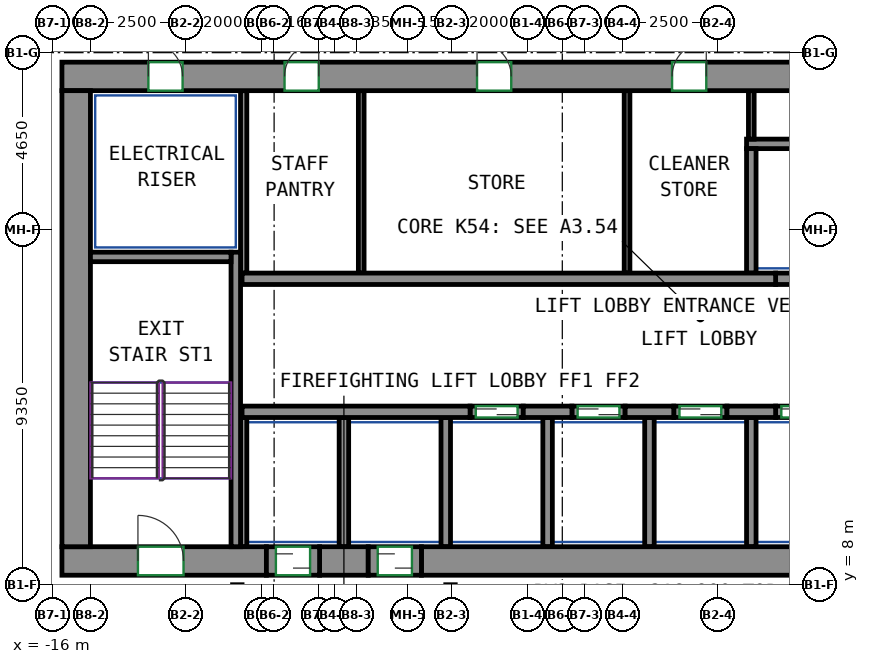
"""IFC4 building model, lengths in metres.
Left out: names, types, materials, properties, quantities, classifications, styles, units other than length and angle.
Written with IfcOpenShell. Run it as: python <this file> out.ifc"""

import sys

from ifc_helpers import new_model, si_unit, direction, frame, frame_2d, origin, place, context, subcontext, project, spatial, rectangle, extrude, source, transform, mapped, element, fill, save


model = new_model("IFC4")
c1 = context("Model", 3, precision=1e-05, world=origin(), true_north=direction((0.0, 1.0)))
c2 = subcontext(c1, "Body", "Model", "MODEL_VIEW")
j1 = project(units=[si_unit("LENGTHUNIT", "METRE"), si_unit("PLANEANGLEUNIT", "RADIAN")], contexts=[c1])
p1 = place(None, origin())
s1 = spatial("IfcSite", under=j1, at=p1, CompositionType="ELEMENT")
p2 = place(p1, origin())
s2 = spatial("IfcBuilding", under=s1, at=p2, CompositionType="ELEMENT")
p3 = place(p2, frame((0.0, 0.0, 216.9)))
s3 = spatial("IfcBuildingStorey", under=s2, at=p3, CompositionType="ELEMENT", Elevation=216.9)
m1 = source(origin(), c2, "Body", "SweptSolid", [
    extrude(rectangle(XDim=5.38, YDim=0.75, at=frame_2d((2.69, 0.0))), origin(), (0.0, 0.0, 1.0), 3.12),
])
p4 = place(p3, frame((-15.75, 8.625, 0.0), z_axis=(0.0, 0.0, 1.0), x_axis=(1.0, 0.0, 0.0)))
e1 = element("IfcWall", 1, at=p4, inside=s3, PredefinedType="SHEAR", context=c2, shape_type="MappedRepresentation", body=[
    mapped(m1, transform((0.0, 0.0, 0.0))),
])
p5 = place(p4, frame((2.0, 0.0, 0.0)))
e2 = element("IfcOpeningElement", 2, at=p5, cuts=e1, PredefinedType="OPENING", context=c2, shape_type="SweptSolid", body=[
    extrude(rectangle(XDim=1.2, YDim=2.1, at=frame_2d((0.6, 1.05))), frame((0.0, 0.385, 0.0), z_axis=(0.0, -1.0, 0.0), x_axis=(1.0, 0.0, 0.0)), (0.0, 0.0, 1.0), 0.77),
])
m2 = source(origin(), c2, "Body", "SweptSolid", [
    extrude(rectangle(XDim=1.28, YDim=0.75, at=frame_2d((0.64, 0.0))), origin(), (0.0, 0.0, 1.0), 3.12),
])
p6 = place(p3, frame((-8.97, 8.625, 0.0), z_axis=(0.0, 0.0, 1.0), x_axis=(1.0, 0.0, 0.0)))
e3 = element("IfcWall", 3, at=p6, inside=s3, PredefinedType="SHEAR", context=c2, shape_type="MappedRepresentation", body=[
    mapped(m2, transform((0.0, 0.0, 0.0))),
])
m3 = source(origin(), c2, "Body", "SweptSolid", [
    extrude(rectangle(XDim=14.18, YDim=0.75, at=frame_2d((7.09, 0.0))), origin(), (0.0, 0.0, 1.0), 3.12),
])
p7 = place(p3, frame((-6.29, 8.625, 0.0), z_axis=(0.0, 0.0, 1.0), x_axis=(1.0, 0.0, 0.0)))
e4 = element("IfcWall", 4, at=p7, inside=s3, PredefinedType="SHEAR", context=c2, shape_type="MappedRepresentation", body=[
    mapped(m3, transform((0.0, 0.0, 0.0))),
])
m4 = source(origin(), c2, "Body", "SweptSolid", [
    extrude(rectangle(XDim=33.6, YDim=0.75, at=frame_2d((16.8, 0.0))), origin(), (0.0, 0.0, 1.0), 3.12),
])
p8 = place(p3, frame((-15.75, 21.375, 0.0), z_axis=(0.0, 0.0, 1.0), x_axis=(1.0, 0.0, 0.0)))
e5 = element("IfcWall", 5, at=p8, inside=s3, PredefinedType="SHEAR", context=c2, shape_type="MappedRepresentation", body=[
    mapped(m4, transform((0.0, 0.0, 0.0))),
])
p9 = place(p8, frame((5.858, 0.0, 0.0)))
e6 = element("IfcOpeningElement", 6, at=p9, cuts=e5, PredefinedType="OPENING", context=c2, shape_type="SweptSolid", body=[
    extrude(rectangle(XDim=0.9, YDim=2.1, at=frame_2d((0.45, 1.05))), frame((0.0, 0.385, 0.0), z_axis=(0.0, -1.0, 0.0), x_axis=(1.0, 0.0, 0.0)), (0.0, 0.0, 1.0), 0.77),
])
p10 = place(p8, frame((10.923, 0.0, 0.0)))
e7 = element("IfcOpeningElement", 7, at=p10, cuts=e5, PredefinedType="OPENING", context=c2, shape_type="SweptSolid", body=[
    extrude(rectangle(XDim=0.9, YDim=2.1, at=frame_2d((0.45, 1.05))), frame((0.0, 0.385, 0.0), z_axis=(0.0, -1.0, 0.0), x_axis=(1.0, 0.0, 0.0)), (0.0, 0.0, 1.0), 0.77),
])
p11 = place(p8, frame((16.055, 0.0, 0.0)))
e8 = element("IfcOpeningElement", 8, at=p11, cuts=e5, PredefinedType="OPENING", context=c2, shape_type="SweptSolid", body=[
    extrude(rectangle(XDim=0.9, YDim=2.1, at=frame_2d((0.45, 1.05))), frame((0.0, 0.385, 0.0), z_axis=(0.0, -1.0, 0.0), x_axis=(1.0, 0.0, 0.0)), (0.0, 0.0, 1.0), 0.77),
])
p12 = place(p8, frame((20.879, 0.0, 0.0)))
e9 = element("IfcOpeningElement", 9, at=p12, cuts=e5, PredefinedType="OPENING", context=c2, shape_type="SweptSolid", body=[
    extrude(rectangle(XDim=0.9, YDim=2.1, at=frame_2d((0.45, 1.05))), frame((0.0, 0.385, 0.0), z_axis=(0.0, -1.0, 0.0), x_axis=(1.0, 0.0, 0.0)), (0.0, 0.0, 1.0), 0.77),
])
p13 = place(p8, frame((26.239, 0.0, 0.0)))
e10 = element("IfcOpeningElement", 10, at=p13, cuts=e5, PredefinedType="OPENING", context=c2, shape_type="SweptSolid", body=[
    extrude(rectangle(XDim=0.9, YDim=2.1, at=frame_2d((0.45, 1.05))), frame((0.0, 0.385, 0.0), z_axis=(0.0, -1.0, 0.0), x_axis=(1.0, 0.0, 0.0)), (0.0, 0.0, 1.0), 0.77),
])
p14 = place(p8, frame((2.275, 0.0, 0.0)))
e11 = element("IfcOpeningElement", 11, at=p14, cuts=e5, PredefinedType="OPENING", context=c2, shape_type="SweptSolid", body=[
    extrude(rectangle(XDim=0.9, YDim=2.1, at=frame_2d((0.45, 1.05))), frame((0.0, 0.385, 0.0), z_axis=(0.0, -1.0, 0.0), x_axis=(1.0, 0.0, 0.0)), (0.0, 0.0, 1.0), 0.77),
])
p15 = place(p8, frame((30.425, 0.0, 0.0)))
e12 = element("IfcOpeningElement", 12, at=p15, cuts=e5, PredefinedType="OPENING", context=c2, shape_type="SweptSolid", body=[
    extrude(rectangle(XDim=0.9, YDim=2.1, at=frame_2d((0.45, 1.05))), frame((0.0, 0.385, 0.0), z_axis=(0.0, -1.0, 0.0), x_axis=(1.0, 0.0, 0.0)), (0.0, 0.0, 1.0), 0.77),
])
m5 = source(origin(), c2, "Body", "SweptSolid", [
    extrude(rectangle(XDim=12.0, YDim=0.75, at=frame_2d((6.0, 0.0))), origin(), (0.0, 0.0, 1.0), 3.12),
])
p16 = place(p3, frame((-15.375, 9.0, 0.0), z_axis=(0.0, 0.0, 1.0), x_axis=(0.0, 1.0, 0.0)))
e13 = element("IfcWall", 13, at=p16, inside=s3, PredefinedType="SHEAR", context=c2, shape_type="MappedRepresentation", body=[
    mapped(m5, transform((0.0, 0.0, 0.0))),
])
m6 = source(origin(), c2, "Body", "SweptSolid", [
    extrude(rectangle(XDim=7.75, YDim=0.25, at=frame_2d((3.875, 0.0))), origin(), (0.0, 0.0, 1.0), 3.12),
])
p17 = place(p3, frame((-11.175, 9.0, 0.0), z_axis=(0.0, 0.0, 1.0), x_axis=(0.0, 1.0, 0.0)))
e14 = element("IfcWall", 14, at=p17, inside=s3, PredefinedType="SHEAR", context=c2, shape_type="MappedRepresentation", body=[
    mapped(m6, transform((0.0, 0.0, 0.0))),
])
m7 = source(origin(), c2, "Body", "SweptSolid", [
    extrude(rectangle(XDim=3.7, YDim=0.25, at=frame_2d((1.85, 0.0))), origin(), (0.0, 0.0, 1.0), 3.12),
])
p18 = place(p3, frame((-15.0, 16.625, 0.0), z_axis=(0.0, 0.0, 1.0), x_axis=(1.0, 0.0, 0.0)))
e15 = element("IfcWall", 15, at=p18, inside=s3, PredefinedType="SHEAR", context=c2, shape_type="MappedRepresentation", body=[
    mapped(m7, transform((0.0, 0.0, 0.0))),
])
m8 = source(origin(), c2, "Body", "SweptSolid", [
    extrude(rectangle(XDim=6.0, YDim=0.3, at=frame_2d((3.0, 0.0))), origin(), (0.0, 0.0, 1.0), 3.12),
])
p19 = place(p3, frame((-11.01, 12.55, 0.0), z_axis=(0.0, 0.0, 1.0), x_axis=(1.0, 0.0, 0.0)))
e16 = element("IfcWall", 16, at=p19, inside=s3, PredefinedType="SHEAR", context=c2, shape_type="MappedRepresentation", body=[
    mapped(m8, transform((0.0, 0.0, 0.0))),
])
m9 = source(origin(), c2, "Body", "SweptSolid", [
    extrude(rectangle(XDim=1.28, YDim=0.3, at=frame_2d((0.64, 0.0))), origin(), (0.0, 0.0, 1.0), 3.12),
])
for number, where, z_axis, x_axis in (
    (17, (-3.61, 12.55, 0.0), (0.0, 0.0, 1.0), (1.0, 0.0, 0.0)),
    (18, (-0.93, 12.55, 0.0), (0.0, 0.0, 1.0), (1.0, 0.0, 0.0)),
    (19, (1.75, 12.55, 0.0), (0.0, 0.0, 1.0), (1.0, 0.0, 0.0)),
):
    element("IfcWall", number, at=place(p3, frame(where, z_axis=z_axis, x_axis=x_axis)), inside=s3, PredefinedType="SHEAR", context=c2, shape_type="MappedRepresentation", body=[
        mapped(m9, transform((0.0, 0.0, 0.0))),
    ])
m10 = source(origin(), c2, "Body", "SweptSolid", [
    extrude(rectangle(XDim=14.04, YDim=0.3, at=frame_2d((7.02, 0.0))), origin(), (0.0, 0.0, 1.0), 3.12),
])
p20 = place(p3, frame((-11.01, 16.05, 0.0), z_axis=(0.0, 0.0, 1.0), x_axis=(1.0, 0.0, 0.0)))
e20 = element("IfcWall", 20, at=p20, inside=s3, PredefinedType="SHEAR", context=c2, shape_type="MappedRepresentation", body=[
    mapped(m10, transform((0.0, 0.0, 0.0))),
])
m11 = source(origin(), c2, "Body", "SweptSolid", [
    extrude(rectangle(XDim=1.4, YDim=0.3, at=frame_2d((0.7, 0.0))), origin(), (0.0, 0.0, 1.0), 3.12),
])
p21 = place(p3, frame((-5.01, 12.55, 0.0), z_axis=(0.0, 0.0, 1.0), x_axis=(1.0, 0.0, 0.0)))
e21 = element("IfcWall", 21, at=p21, inside=s3, PredefinedType="PARTITIONING", context=c2, shape_type="MappedRepresentation", body=[
    mapped(m11, transform((0.0, 0.0, 0.0))),
])
p22 = place(p21, frame((0.15, 0.0, 0.0)))
e22 = element("IfcOpeningElement", 22, at=p22, cuts=e21, PredefinedType="OPENING", context=c2, shape_type="SweptSolid", body=[
    extrude(rectangle(XDim=1.1, YDim=2.1, at=frame_2d((0.55, 1.05))), frame((0.0, 0.16, 0.0), z_axis=(0.0, -1.0, 0.0), x_axis=(1.0, 0.0, 0.0)), (0.0, 0.0, 1.0), 0.32),
])
m12 = source(origin(), c2, "Body", "SweptSolid", [
    extrude(rectangle(XDim=1.4, YDim=0.3, at=frame_2d((0.7, 0.0))), origin(), (0.0, 0.0, 1.0), 3.12),
])
p23 = place(p3, frame((-2.33, 12.55, 0.0), z_axis=(0.0, 0.0, 1.0), x_axis=(1.0, 0.0, 0.0)))
e23 = element("IfcWall", 23, at=p23, inside=s3, PredefinedType="PARTITIONING", context=c2, shape_type="MappedRepresentation", body=[
    mapped(m12, transform((0.0, 0.0, 0.0))),
])
p24 = place(p23, frame((0.15, 0.0, 0.0)))
e24 = element("IfcOpeningElement", 24, at=p24, cuts=e23, PredefinedType="OPENING", context=c2, shape_type="SweptSolid", body=[
    extrude(rectangle(XDim=1.1, YDim=2.1, at=frame_2d((0.55, 1.05))), frame((0.0, 0.16, 0.0), z_axis=(0.0, -1.0, 0.0), x_axis=(1.0, 0.0, 0.0)), (0.0, 0.0, 1.0), 0.32),
])
p25 = place(p3, frame((0.35, 12.55, 0.0), z_axis=(0.0, 0.0, 1.0), x_axis=(1.0, 0.0, 0.0)))
e25 = element("IfcWall", 25, at=p25, inside=s3, PredefinedType="PARTITIONING", context=c2, shape_type="MappedRepresentation", body=[
    mapped(m11, transform((0.0, 0.0, 0.0))),
])
p26 = place(p25, frame((0.15, 0.0, 0.0)))
e26 = element("IfcOpeningElement", 26, at=p26, cuts=e25, PredefinedType="OPENING", context=c2, shape_type="SweptSolid", body=[
    extrude(rectangle(XDim=1.1, YDim=2.1, at=frame_2d((0.55, 1.05))), frame((0.0, 0.16, 0.0), z_axis=(0.0, -1.0, 0.0), x_axis=(1.0, 0.0, 0.0)), (0.0, 0.0, 1.0), 0.32),
])
p27 = place(p3, frame((3.03, 12.55, 0.0), z_axis=(0.0, 0.0, 1.0), x_axis=(1.0, 0.0, 0.0)))
e27 = element("IfcWall", 27, at=p27, inside=s3, PredefinedType="PARTITIONING", context=c2, shape_type="MappedRepresentation", body=[
    mapped(m11, transform((0.0, 0.0, 0.0))),
])
p28 = place(p27, frame((0.15, 0.0, 0.0)))
e28 = element("IfcOpeningElement", 28, at=p28, cuts=e27, PredefinedType="OPENING", context=c2, shape_type="SweptSolid", body=[
    extrude(rectangle(XDim=1.1, YDim=2.1, at=frame_2d((0.55, 1.05))), frame((0.0, 0.16, 0.0), z_axis=(0.0, -1.0, 0.0), x_axis=(1.0, 0.0, 0.0)), (0.0, 0.0, 1.0), 0.32),
])
p29 = place(p3, frame((3.03, 16.05, 0.0), z_axis=(0.0, 0.0, 1.0), x_axis=(1.0, 0.0, 0.0)))
e29 = element("IfcWall", 29, at=p29, inside=s3, PredefinedType="PARTITIONING", context=c2, shape_type="MappedRepresentation", body=[
    mapped(m11, transform((0.0, 0.0, 0.0))),
])
m13 = source(origin(), c2, "Body", "SweptSolid", [
    extrude(rectangle(XDim=10.97, YDim=0.25, at=frame_2d((5.485, 0.0))), origin(), (0.0, 0.0, 1.0), 3.12),
])
p30 = place(p3, frame((2.265, 19.6, 0.0), z_axis=(0.0, 0.0, 1.0), x_axis=(1.0, 0.0, 0.0)))
e30 = element("IfcWall", 30, at=p30, inside=s3, PredefinedType="PARTITIONING", context=c2, shape_type="MappedRepresentation", body=[
    mapped(m13, transform((0.0, 0.0, 0.0))),
])
m14 = source(origin(), c2, "Body", "SweptSolid", [
    extrude(rectangle(XDim=4.8, YDim=0.165, at=frame_2d((2.4, 0.0))), origin(), (0.0, 0.0, 1.0), 3.12),
])
p31 = place(p3, frame((-10.968, 16.2, 0.0), z_axis=(0.0, 0.0, 1.0), x_axis=(0.0, 1.0, 0.0)))
e31 = element("IfcWall", 31, at=p31, inside=s3, PredefinedType="PARTITIONING", context=c2, shape_type="MappedRepresentation", body=[
    mapped(m14, transform((0.0, 0.0, 0.0))),
])
m15 = source(origin(), c2, "Body", "SweptSolid", [
    extrude(rectangle(XDim=3.275, YDim=0.25, at=frame_2d((1.638, 0.0))), origin(), (0.0, 0.0, 1.0), 3.12),
])
p32 = place(p3, frame((2.39, 16.2, 0.0), z_axis=(0.0, 0.0, 1.0), x_axis=(0.0, 1.0, 0.0)))
e32 = element("IfcWall", 32, at=p32, inside=s3, PredefinedType="PARTITIONING", context=c2, shape_type="MappedRepresentation", body=[
    mapped(m15, transform((0.0, 0.0, 0.0))),
])
m16 = source(origin(), c2, "Body", "SweptSolid", [
    extrude(rectangle(XDim=3.4, YDim=0.25, at=frame_2d((1.7, 0.0))), origin(), (0.0, 0.0, 1.0), 3.12),
])
for number, where, z_axis, x_axis in (
    (33, (2.39, 9.0, 0.0), (0.0, 0.0, 1.0), (0.0, 1.0, 0.0)),
    (34, (-0.29, 9.0, 0.0), (0.0, 0.0, 1.0), (0.0, 1.0, 0.0)),
):
    element("IfcWall", number, at=place(p3, frame(where, z_axis=z_axis, x_axis=x_axis)), inside=s3, PredefinedType="PARTITIONING", context=c2, shape_type="MappedRepresentation", body=[
        mapped(m16, transform((0.0, 0.0, 0.0))),
    ])
m17 = source(origin(), c2, "Body", "SweptSolid", [
    extrude(rectangle(XDim=3.4, YDim=0.165, at=frame_2d((1.7, 0.0))), origin(), (0.0, 0.0, 1.0), 3.12),
])
p33 = place(p3, frame((-10.968, 9.0, 0.0), z_axis=(0.0, 0.0, 1.0), x_axis=(0.0, 1.0, 0.0)))
e35 = element("IfcWall", 35, at=p33, inside=s3, PredefinedType="PARTITIONING", context=c2, shape_type="MappedRepresentation", body=[
    mapped(m17, transform((0.0, 0.0, 0.0))),
])
for number, where, z_axis, x_axis in (
    (36, (-2.97, 9.0, 0.0), (0.0, 0.0, 1.0), (0.0, 1.0, 0.0)),
    (37, (-5.65, 9.0, 0.0), (0.0, 0.0, 1.0), (0.0, 1.0, 0.0)),
    (38, (-8.33, 9.0, 0.0), (0.0, 0.0, 1.0), (0.0, 1.0, 0.0)),
):
    element("IfcWall", number, at=place(p3, frame(where, z_axis=z_axis, x_axis=x_axis)), inside=s3, PredefinedType="PARTITIONING", context=c2, shape_type="MappedRepresentation", body=[
        mapped(m16, transform((0.0, 0.0, 0.0))),
    ])
m18 = source(origin(), c2, "Body", "SweptSolid", [
    extrude(rectangle(XDim=4.8, YDim=0.15, at=frame_2d((2.4, 0.0))), origin(), (0.0, 0.0, 1.0), 3.12),
])
for number, where, z_axis, x_axis in (
    (39, (-7.875, 16.2, 0.0), (0.0, 0.0, 1.0), (0.0, 1.0, 0.0)),
    (40, (-0.88, 16.2, 0.0), (0.0, 0.0, 1.0), (0.0, 1.0, 0.0)),
):
    element("IfcWall", number, at=place(p3, frame(where, z_axis=z_axis, x_axis=x_axis)), inside=s3, PredefinedType="PARTITIONING", context=c2, shape_type="MappedRepresentation", body=[
        mapped(m18, transform((0.0, 0.0, 0.0))),
    ])
m19 = source(origin(), c2, "Body", "SweptSolid", [
    extrude(rectangle(XDim=1.275, YDim=0.15, at=frame_2d((0.637, 0.0))), origin(), (0.0, 0.0, 1.0), 3.12),
])
p34 = place(p3, frame((2.39, 19.725, 0.0), z_axis=(0.0, 0.0, 1.0), x_axis=(0.0, 1.0, 0.0)))
e41 = element("IfcWall", 41, at=p34, inside=s3, PredefinedType="PARTITIONING", context=c2, shape_type="MappedRepresentation", body=[
    mapped(m19, transform((0.0, 0.0, 0.0))),
])
m20 = source(origin(), c2, "Body", "SweptSolid", [
    extrude(rectangle(XDim=1.4, YDim=0.75, at=frame_2d((0.7, 0.0))), origin(), (0.0, 0.0, 1.0), 2.7),
])
p35 = place(p3, frame((-10.37, 8.625, 0.0), z_axis=(0.0, 0.0, 1.0), x_axis=(1.0, 0.0, 0.0)))
e42 = element("IfcWall", 42, at=p35, inside=s3, PredefinedType="PARTITIONING", context=c2, shape_type="MappedRepresentation", body=[
    mapped(m20, transform((0.0, 0.0, 0.0))),
])
p36 = place(p35, frame((0.25, 0.0, 0.0)))
e43 = element("IfcOpeningElement", 43, at=p36, cuts=e42, PredefinedType="OPENING", context=c2, shape_type="SweptSolid", body=[
    extrude(rectangle(XDim=0.9, YDim=2.1, at=frame_2d((0.45, 1.05))), frame((0.0, 0.385, 0.0), z_axis=(0.0, -1.0, 0.0), x_axis=(1.0, 0.0, 0.0)), (0.0, 0.0, 1.0), 0.77),
])
m21 = source(origin(), c2, "Body", "SweptSolid", [
    extrude(rectangle(XDim=1.4, YDim=0.75, at=frame_2d((0.7, 0.0))), origin(), (0.0, 0.0, 1.0), 2.7),
])
p37 = place(p3, frame((-7.69, 8.625, 0.0), z_axis=(0.0, 0.0, 1.0), x_axis=(1.0, 0.0, 0.0)))
e44 = element("IfcWall", 44, at=p37, inside=s3, PredefinedType="PARTITIONING", context=c2, shape_type="MappedRepresentation", body=[
    mapped(m21, transform((0.0, 0.0, 0.0))),
])
p38 = place(p37, frame((0.25, 0.0, 0.0)))
e45 = element("IfcOpeningElement", 45, at=p38, cuts=e44, PredefinedType="OPENING", context=c2, shape_type="SweptSolid", body=[
    extrude(rectangle(XDim=0.9, YDim=2.1, at=frame_2d((0.45, 1.05))), frame((0.0, 0.385, 0.0), z_axis=(0.0, -1.0, 0.0), x_axis=(1.0, 0.0, 0.0)), (0.0, 0.0, 1.0), 0.77),
])
p39 = place(p36, origin())
e46 = element("IfcDoor", 46, at=p39, inside=s3, OperationType="SLIDING_TO_LEFT", PredefinedType="DOOR", context=c2, shape_type="SweptSolid", body=[
    extrude(rectangle(XDim=0.9, YDim=2.1, at=frame_2d((0.45, 1.05))), frame((0.0, 0.28, 0.0), z_axis=(0.0, -1.0, 0.0), x_axis=(1.0, 0.0, 0.0)), (0.0, 0.0, 1.0), 0.05),
])
fill(e43, e46)
p40 = place(p38, origin())
e47 = element("IfcDoor", 47, at=p40, inside=s3, OperationType="SLIDING_TO_RIGHT", PredefinedType="DOOR", context=c2, shape_type="SweptSolid", body=[
    extrude(rectangle(XDim=0.9, YDim=2.1, at=frame_2d((0.45, 1.05))), frame((0.0, 0.28, 0.0), z_axis=(0.0, -1.0, 0.0), x_axis=(1.0, 0.0, 0.0)), (0.0, 0.0, 1.0), 0.05),
])
fill(e45, e47)
p41 = place(p22, origin())
e48 = element("IfcDoor", 48, at=p41, inside=s3, OperationType="DOUBLE_DOOR_SLIDING", PredefinedType="DOOR", context=c2, shape_type="SweptSolid", body=[
    extrude(rectangle(XDim=1.1, YDim=2.1, at=frame_2d((0.55, 1.05))), frame((0.0, 0.025, 0.0), z_axis=(0.0, -1.0, 0.0), x_axis=(1.0, 0.0, 0.0)), (0.0, 0.0, 1.0), 0.05),
])
fill(e22, e48)
p42 = place(p24, origin())
e49 = element("IfcDoor", 49, at=p42, inside=s3, OperationType="DOUBLE_DOOR_SLIDING", PredefinedType="DOOR", context=c2, shape_type="SweptSolid", body=[
    extrude(rectangle(XDim=1.1, YDim=2.1, at=frame_2d((0.55, 1.05))), frame((0.0, 0.025, 0.0), z_axis=(0.0, -1.0, 0.0), x_axis=(1.0, 0.0, 0.0)), (0.0, 0.0, 1.0), 0.05),
])
fill(e24, e49)
p43 = place(p26, origin())
e50 = element("IfcDoor", 50, at=p43, inside=s3, OperationType="DOUBLE_DOOR_SLIDING", PredefinedType="DOOR", context=c2, shape_type="SweptSolid", body=[
    extrude(rectangle(XDim=1.1, YDim=2.1, at=frame_2d((0.55, 1.05))), frame((0.0, 0.025, 0.0), z_axis=(0.0, -1.0, 0.0), x_axis=(1.0, 0.0, 0.0)), (0.0, 0.0, 1.0), 0.05),
])
fill(e26, e50)
p44 = place(p28, origin())
e51 = element("IfcDoor", 51, at=p44, inside=s3, OperationType="DOUBLE_DOOR_SLIDING", PredefinedType="DOOR", context=c2, shape_type="SweptSolid", body=[
    extrude(rectangle(XDim=1.1, YDim=2.1, at=frame_2d((0.55, 1.05))), frame((0.0, 0.025, 0.0), z_axis=(0.0, -1.0, 0.0), x_axis=(1.0, 0.0, 0.0)), (0.0, 0.0, 1.0), 0.05),
])
fill(e28, e51)
p45 = place(p9, origin())
e52 = element("IfcDoor", 52, at=p45, inside=s3, OperationType="SINGLE_SWING_RIGHT", PredefinedType="DOOR", context=c2, shape_type="SweptSolid", body=[
    extrude(rectangle(XDim=0.9, YDim=2.1, at=frame_2d((0.45, 1.05))), frame((0.0, -0.23, 0.0), z_axis=(0.0, -1.0, 0.0), x_axis=(1.0, 0.0, 0.0)), (0.0, 0.0, 1.0), 0.05),
])
fill(e6, e52)
p46 = place(p10, origin())
e53 = element("IfcDoor", 53, at=p46, inside=s3, OperationType="SINGLE_SWING_LEFT", PredefinedType="DOOR", context=c2, shape_type="SweptSolid", body=[
    extrude(rectangle(XDim=0.9, YDim=2.1, at=frame_2d((0.45, 1.05))), frame((0.0, -0.23, 0.0), z_axis=(0.0, -1.0, 0.0), x_axis=(1.0, 0.0, 0.0)), (0.0, 0.0, 1.0), 0.05),
])
fill(e7, e53)
p47 = place(p11, origin())
e54 = element("IfcDoor", 54, at=p47, inside=s3, OperationType="SINGLE_SWING_RIGHT", PredefinedType="DOOR", context=c2, shape_type="SweptSolid", body=[
    extrude(rectangle(XDim=0.9, YDim=2.1, at=frame_2d((0.45, 1.05))), frame((0.0, -0.23, 0.0), z_axis=(0.0, -1.0, 0.0), x_axis=(1.0, 0.0, 0.0)), (0.0, 0.0, 1.0), 0.05),
])
fill(e8, e54)
p48 = place(p14, origin())
e55 = element("IfcDoor", 55, at=p48, inside=s3, OperationType="SINGLE_SWING_LEFT", PredefinedType="DOOR", context=c2, shape_type="SweptSolid", body=[
    extrude(rectangle(XDim=0.9, YDim=2.1, at=frame_2d((0.45, 1.05))), frame((0.0, -0.23, 0.0), z_axis=(0.0, -1.0, 0.0), x_axis=(1.0, 0.0, 0.0)), (0.0, 0.0, 1.0), 0.05),
])
fill(e11, e55)
p49 = place(p5, origin())
e56 = element("IfcDoor", 56, at=p49, inside=s3, OperationType="DOUBLE_DOOR_SINGLE_SWING", PredefinedType="DOOR", context=c2, shape_type="SweptSolid", body=[
    extrude(rectangle(XDim=1.2, YDim=2.1, at=frame_2d((0.6, 1.05))), frame((0.0, 0.28, 0.0), z_axis=(0.0, -1.0, 0.0), x_axis=(1.0, 0.0, 0.0)), (0.0, 0.0, 1.0), 0.05),
])
fill(e2, e56)
save(model, sys.argv[1])
